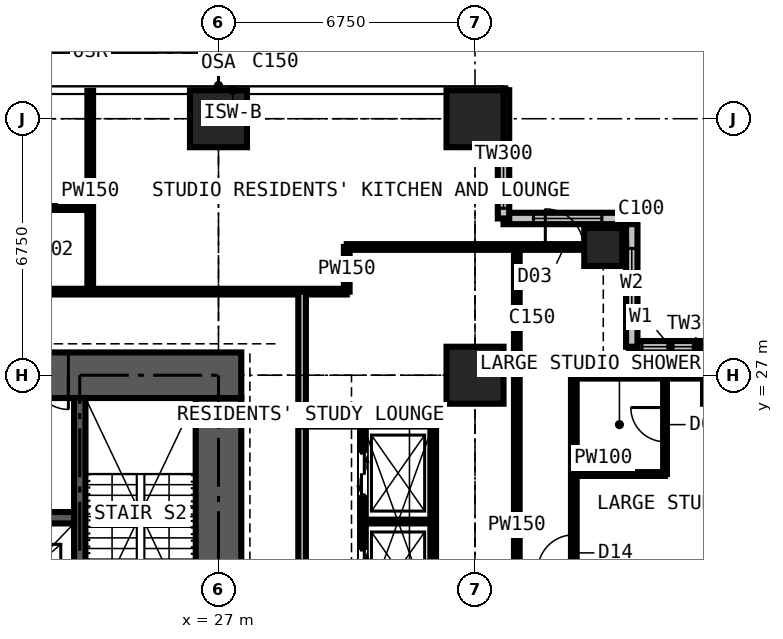
"""IFC4 building model, lengths in metres.
Left out: names, types, materials, properties, quantities, classifications, styles, units other than length and angle.
Written with IfcOpenShell. Run it as: python <this file> out.ifc"""

import sys

from ifc_helpers import new_model, si_unit, direction, frame, frame_2d, origin, origin_2d, place, context, subcontext, project, spatial, rectangle, extrude, element, fill, save


model = new_model("IFC4")
c1 = context("Model", 3, precision=1e-05, world=origin(), true_north=direction((0.0, 1.0)))
c2 = subcontext(c1, "Body", "Model", "MODEL_VIEW")
j1 = project(units=[si_unit("LENGTHUNIT", "METRE"), si_unit("PLANEANGLEUNIT", "RADIAN")], contexts=[c1])
p1 = place(None, origin())
s1 = spatial("IfcSite", under=j1, at=p1, CompositionType="ELEMENT")
p2 = place(p1, origin())
s2 = spatial("IfcBuilding", under=s1, at=p2, CompositionType="ELEMENT")
p3 = place(p2, frame((0.0, 0.0, 116.1)))
s3 = spatial("IfcBuildingStorey", under=s2, at=p3, CompositionType="ELEMENT", Elevation=116.1)
for number, where, z_axis, x_axis in (
    (1, (27.0, 33.75, 0.0), (0.0, 0.0, 1.0), (1.0, 0.0, 0.0)),
    (2, (33.75, 27.0, 0.0), (0.0, 0.0, 1.0), (1.0, 0.0, 0.0)),
    (3, (33.75, 33.75, 0.0), (0.0, 0.0, 1.0), (1.0, 0.0, 0.0)),
):
    element("IfcColumn", number, at=place(p3, frame(where, z_axis=z_axis, x_axis=x_axis)), inside=s3, PredefinedType="COLUMN", context=c2, shape_type="SweptSolid", body=[
        extrude(rectangle(XDim=1.5, YDim=1.5, at=origin_2d()), origin(), (0.0, 0.0, 1.0), 3.6),
    ])
p4 = place(p3, frame((37.125, 30.375, 0.0), z_axis=(0.0, 0.0, 1.0), x_axis=(1.0, 0.0, 0.0)))
e4 = element("IfcColumn", 4, at=p4, inside=s3, PredefinedType="COLUMN", context=c2, shape_type="SweptSolid", body=[
    extrude(rectangle(XDim=1.0, YDim=1.0, at=origin_2d()), origin(), (0.0, 0.0, 1.0), 3.6),
])
p5 = place(p3, frame((27.0, 14.1, 0.0), z_axis=(0.0, 0.0, 1.0), x_axis=(0.0, 1.0, 0.0)))
e5 = element("IfcWall", 5, at=p5, inside=s3, PredefinedType="SHEAR", context=c2, shape_type="SweptSolid", body=[
    extrude(rectangle(XDim=12.3, YDim=1.2, at=frame_2d((6.15, 0.0))), origin(), (0.0, 0.0, 1.0), 3.6),
])
p6 = place(p5, frame((3.65, 0.0, 0.0)))
e6 = element("IfcOpeningElement", 6, at=p6, cuts=e5, PredefinedType="OPENING", context=c2, shape_type="SweptSolid", body=[
    extrude(rectangle(XDim=1.2, YDim=2.2, at=frame_2d((0.6, 1.1))), frame((0.0, 0.61, 0.0), z_axis=(0.0, -1.0, 0.0), x_axis=(1.0, 0.0, 0.0)), (0.0, 0.0, 1.0), 1.22),
])
p7 = place(p3, frame((27.6, 27.0, 0.0), z_axis=(0.0, 0.0, 1.0), x_axis=(-1.0, 0.0, 0.0)))
e7 = element("IfcWall", 7, at=p7, inside=s3, PredefinedType="SHEAR", context=c2, shape_type="SweptSolid", body=[
    extrude(rectangle(XDim=14.7, YDim=1.2, at=frame_2d((7.35, 0.0))), origin(), (0.0, 0.0, 1.0), 3.6),
])
p8 = place(p7, frame((4.55, 0.0, 0.0)))
e8 = element("IfcOpeningElement", 8, at=p8, cuts=e7, PredefinedType="OPENING", context=c2, shape_type="SweptSolid", body=[
    extrude(rectangle(XDim=0.9, YDim=2.2, at=frame_2d((0.45, 1.1))), frame((0.0, 0.61, 0.0), z_axis=(0.0, -1.0, 0.0), x_axis=(1.0, 0.0, 0.0)), (0.0, 0.0, 1.0), 1.22),
])
p9 = place(p7, frame((7.525, 0.0, 0.0)))
e9 = element("IfcOpeningElement", 9, at=p9, cuts=e7, PredefinedType="OPENING", context=c2, shape_type="SweptSolid", body=[
    extrude(rectangle(XDim=1.0, YDim=2.2, at=frame_2d((0.5, 1.1))), frame((0.0, 0.61, 0.0), z_axis=(0.0, -1.0, 0.0), x_axis=(1.0, 0.0, 0.0)), (0.0, 0.0, 1.0), 1.22),
])
p10 = place(p3, frame((41.25, 27.75, 0.0), z_axis=(0.0, 0.0, 1.0), x_axis=(-1.0, 0.0, 0.0)))
e10 = element("IfcWall", 10, at=p10, inside=s3, PredefinedType="SOLIDWALL", context=c2, shape_type="SweptSolid", body=[
    extrude(rectangle(XDim=3.375, YDim=0.3, at=frame_2d((1.688, 0.0))), origin(), (0.0, 0.0, 1.0), 3.375),
])
p11 = place(p10, frame((1.607, 0.0, 0.9)))
e11 = element("IfcOpeningElement", 11, at=p11, cuts=e10, PredefinedType="OPENING", context=c2, shape_type="SweptSolid", body=[
    extrude(rectangle(XDim=1.5, YDim=1.8, at=frame_2d((0.75, 0.9))), frame((0.0, 0.16, 0.0), z_axis=(0.0, -1.0, 0.0), x_axis=(1.0, 0.0, 0.0)), (0.0, 0.0, 1.0), 0.32),
])
p12 = place(p3, frame((37.875, 27.75, 0.0), z_axis=(0.0, 0.0, 1.0), x_axis=(0.0, 1.0, 0.0)))
e12 = element("IfcWall", 12, at=p12, inside=s3, PredefinedType="SOLIDWALL", context=c2, shape_type="SweptSolid", body=[
    extrude(rectangle(XDim=3.375, YDim=0.3, at=frame_2d((1.688, 0.0))), origin(), (0.0, 0.0, 1.0), 3.375),
])
p13 = place(p12, frame((0.788, 0.0, 0.6)))
e13 = element("IfcOpeningElement", 13, at=p13, cuts=e12, PredefinedType="OPENING", context=c2, shape_type="SweptSolid", body=[
    extrude(rectangle(XDim=1.8, YDim=2.1, at=frame_2d((0.9, 1.05))), frame((0.0, 0.16, 0.0), z_axis=(0.0, -1.0, 0.0), x_axis=(1.0, 0.0, 0.0)), (0.0, 0.0, 1.0), 0.32),
])
p14 = place(p3, frame((37.875, 31.125, 0.0), z_axis=(0.0, 0.0, 1.0), x_axis=(-1.0, 0.0, 0.0)))
e14 = element("IfcWall", 14, at=p14, inside=s3, PredefinedType="SOLIDWALL", context=c2, shape_type="SweptSolid", body=[
    extrude(rectangle(XDim=3.375, YDim=0.3, at=frame_2d((1.688, 0.0))), origin(), (0.0, 0.0, 1.0), 3.375),
])
p15 = place(p14, frame((0.788, 0.0, 0.6)))
e15 = element("IfcOpeningElement", 15, at=p15, cuts=e14, PredefinedType="OPENING", context=c2, shape_type="SweptSolid", body=[
    extrude(rectangle(XDim=1.8, YDim=2.1, at=frame_2d((0.9, 1.05))), frame((0.0, 0.16, 0.0), z_axis=(0.0, -1.0, 0.0), x_axis=(1.0, 0.0, 0.0)), (0.0, 0.0, 1.0), 0.32),
])
p16 = place(p3, frame((34.5, 31.125, 0.0), z_axis=(0.0, 0.0, 1.0), x_axis=(0.0, 1.0, 0.0)))
e16 = element("IfcWall", 16, at=p16, inside=s3, PredefinedType="SOLIDWALL", context=c2, shape_type="SweptSolid", body=[
    extrude(rectangle(XDim=3.375, YDim=0.3, at=frame_2d((1.688, 0.0))), origin(), (0.0, 0.0, 1.0), 3.375),
])
p17 = place(p16, frame((0.268, 0.0, 0.9)))
e17 = element("IfcOpeningElement", 17, at=p17, cuts=e16, PredefinedType="OPENING", context=c2, shape_type="SweptSolid", body=[
    extrude(rectangle(XDim=1.5, YDim=1.8, at=frame_2d((0.75, 0.9))), frame((0.0, 0.16, 0.0), z_axis=(0.0, -1.0, 0.0), x_axis=(1.0, 0.0, 0.0)), (0.0, 0.0, 1.0), 0.32),
])
p18 = place(p3, frame((23.35, 20.3, 0.0), z_axis=(0.0, 0.0, 1.0), x_axis=(0.0, 1.0, 0.0)))
e18 = element("IfcWall", 18, at=p18, inside=s3, PredefinedType="SHEAR", context=c2, shape_type="SweptSolid", body=[
    extrude(rectangle(XDim=6.1, YDim=0.3, at=frame_2d((3.05, 0.0))), origin(), (0.0, 0.0, 1.0), 3.6),
])
p19 = place(p3, frame((17.3, 23.25, 0.0), z_axis=(0.0, 0.0, 1.0), x_axis=(1.0, 0.0, 0.0)))
e19 = element("IfcWall", 19, at=p19, inside=s3, PredefinedType="SHEAR", context=c2, shape_type="SweptSolid", body=[
    extrude(rectangle(XDim=5.9, YDim=0.3, at=frame_2d((2.95, 0.0))), origin(), (0.0, 0.0, 1.0), 3.6),
])
p20 = place(p3, frame((11.3, 29.2, 0.0), z_axis=(0.0, 0.0, 1.0), x_axis=(1.0, 0.0, 0.0)))
e20 = element("IfcWall", 20, at=p20, inside=s3, PredefinedType="PARTITIONING", context=c2, shape_type="SweptSolid", body=[
    extrude(rectangle(XDim=19.075, YDim=0.15, at=frame_2d((9.538, 0.0))), origin(), (0.0, 0.0, 1.0), 3.375),
])
p21 = place(p20, frame((5.825, 0.0, 0.0)))
e21 = element("IfcOpeningElement", 21, at=p21, cuts=e20, PredefinedType="OPENING", context=c2, shape_type="SweptSolid", body=[
    extrude(rectangle(XDim=0.95, YDim=2.2, at=frame_2d((0.475, 1.1))), frame((0.0, 0.085, 0.0), z_axis=(0.0, -1.0, 0.0), x_axis=(1.0, 0.0, 0.0)), (0.0, 0.0, 1.0), 0.17),
])
p22 = place(p20, frame((9.2, 0.0, 0.0)))
e22 = element("IfcOpeningElement", 22, at=p22, cuts=e20, PredefinedType="OPENING", context=c2, shape_type="SweptSolid", body=[
    extrude(rectangle(XDim=0.95, YDim=2.2, at=frame_2d((0.475, 1.1))), frame((0.0, 0.085, 0.0), z_axis=(0.0, -1.0, 0.0), x_axis=(1.0, 0.0, 0.0)), (0.0, 0.0, 1.0), 0.17),
])
p23 = place(p20, frame((0.6, 0.0, 0.0)))
e23 = element("IfcOpeningElement", 23, at=p23, cuts=e20, PredefinedType="OPENING", context=c2, shape_type="SweptSolid", body=[
    extrude(rectangle(XDim=1.0, YDim=2.2, at=frame_2d((0.5, 1.1))), frame((0.0, 0.085, 0.0), z_axis=(0.0, -1.0, 0.0), x_axis=(1.0, 0.0, 0.0)), (0.0, 0.0, 1.0), 0.17),
])
p24 = place(p3, frame((21.625, 31.4, 0.0), z_axis=(0.0, 0.0, 1.0), x_axis=(1.0, 0.0, 0.0)))
e24 = element("IfcWall", 24, at=p24, inside=s3, PredefinedType="PARTITIONING", context=c2, shape_type="SweptSolid", body=[
    extrude(rectangle(XDim=2.0, YDim=0.1, at=frame_2d((1.0, 0.0))), origin(), (0.0, 0.0, 1.0), 3.375),
])
p25 = place(p3, frame((23.625, 29.2, 0.0), z_axis=(0.0, 0.0, 1.0), x_axis=(0.0, 1.0, 0.0)))
e25 = element("IfcWall", 25, at=p25, inside=s3, PredefinedType="PARTITIONING", context=c2, shape_type="SweptSolid", body=[
    extrude(rectangle(XDim=5.284, YDim=0.15, at=frame_2d((2.642, 0.0))), origin(), (0.0, 0.0, 1.0), 3.375),
])
p26 = place(p3, frame((29.2, 11.3, 0.0), z_axis=(0.0, 0.0, 1.0), x_axis=(0.0, 1.0, 0.0)))
e26 = element("IfcWall", 26, at=p26, inside=s3, PredefinedType="PARTITIONING", context=c2, shape_type="SweptSolid", body=[
    extrude(rectangle(XDim=17.9, YDim=0.2, at=frame_2d((8.95, 0.0))), origin(), (0.0, 0.0, 1.0), 3.375),
])
p27 = place(p26, frame((8.35, 0.0, 0.0)))
e27 = element("IfcOpeningElement", 27, at=p27, cuts=e26, PredefinedType="OPENING", context=c2, shape_type="SweptSolid", body=[
    extrude(rectangle(XDim=1.2, YDim=2.2, at=frame_2d((0.6, 1.1))), frame((0.0, 0.11, 0.0), z_axis=(0.0, -1.0, 0.0), x_axis=(1.0, 0.0, 0.0)), (0.0, 0.0, 1.0), 0.22),
])
p28 = place(p3, frame((29.2, 25.7, 0.0), z_axis=(0.0, 0.0, 1.0), x_axis=(1.0, 0.0, 0.0)))
e28 = element("IfcWall", 28, at=p28, inside=s3, PredefinedType="SHEAR", context=c2, shape_type="SweptSolid", body=[
    extrude(rectangle(XDim=3.45, YDim=0.1, at=frame_2d((1.725, 0.0))), origin(), (0.0, 0.0, 1.0), 3.375),
])
p29 = place(p3, frame((30.375, 29.2, 0.0), z_axis=(0.0, 0.0, 1.0), x_axis=(0.0, 1.0, 0.0)))
e29 = element("IfcWall", 29, at=p29, inside=s3, PredefinedType="PARTITIONING", context=c2, shape_type="SweptSolid", body=[
    extrude(rectangle(XDim=1.175, YDim=0.15, at=frame_2d((0.587, 0.0))), origin(), (0.0, 0.0, 1.0), 3.375),
])
p30 = place(p3, frame((30.375, 30.375, 0.0), z_axis=(0.0, 0.0, 1.0), x_axis=(1.0, 0.0, 0.0)))
e30 = element("IfcWall", 30, at=p30, inside=s3, PredefinedType="PARTITIONING", context=c2, shape_type="SweptSolid", body=[
    extrude(rectangle(XDim=7.35, YDim=0.15, at=frame_2d((3.675, 0.0))), origin(), (0.0, 0.0, 1.0), 2.877),
])
p31 = place(p30, frame((5.225, 0.0, 0.0)))
e31 = element("IfcOpeningElement", 31, at=p31, cuts=e30, PredefinedType="OPENING", context=c2, shape_type="SweptSolid", body=[
    extrude(rectangle(XDim=1.0, YDim=2.2, at=frame_2d((0.5, 1.1))), frame((0.0, 0.085, 0.0), z_axis=(0.0, -1.0, 0.0), x_axis=(1.0, 0.0, 0.0)), (0.0, 0.0, 1.0), 0.17),
])
p32 = place(p3, frame((30.8, 14.8, 0.0), z_axis=(0.0, 0.0, 1.0), x_axis=(0.0, 1.0, 0.0)))
e32 = element("IfcWall", 32, at=p32, inside=s3, PredefinedType="PARTITIONING", context=c2, shape_type="SweptSolid", body=[
    extrude(rectangle(XDim=10.9, YDim=0.15, at=frame_2d((5.45, 0.0))), origin(), (0.0, 0.0, 1.0), 3.375),
])
p33 = place(p32, frame((0.75, 0.0, 0.0)))
e33 = element("IfcOpeningElement", 33, at=p33, cuts=e32, PredefinedType="OPENING", context=c2, shape_type="SweptSolid", body=[
    extrude(rectangle(XDim=1.1, YDim=2.2, at=frame_2d((0.55, 1.1))), frame((0.0, 0.085, 0.0), z_axis=(0.0, -1.0, 0.0), x_axis=(1.0, 0.0, 0.0)), (0.0, 0.0, 1.0), 0.17),
])
p34 = place(p32, frame((3.25, 0.0, 0.0)))
e34 = element("IfcOpeningElement", 34, at=p34, cuts=e32, PredefinedType="OPENING", context=c2, shape_type="SweptSolid", body=[
    extrude(rectangle(XDim=1.1, YDim=2.2, at=frame_2d((0.55, 1.1))), frame((0.0, 0.085, 0.0), z_axis=(0.0, -1.0, 0.0), x_axis=(1.0, 0.0, 0.0)), (0.0, 0.0, 1.0), 0.17),
])
p35 = place(p32, frame((6.5, 0.0, 0.0)))
e35 = element("IfcOpeningElement", 35, at=p35, cuts=e32, PredefinedType="OPENING", context=c2, shape_type="SweptSolid", body=[
    extrude(rectangle(XDim=1.1, YDim=2.2, at=frame_2d((0.55, 1.1))), frame((0.0, 0.085, 0.0), z_axis=(0.0, -1.0, 0.0), x_axis=(1.0, 0.0, 0.0)), (0.0, 0.0, 1.0), 0.17),
])
p36 = place(p32, frame((9.05, 0.0, 0.0)))
e36 = element("IfcOpeningElement", 36, at=p36, cuts=e32, PredefinedType="OPENING", context=c2, shape_type="SweptSolid", body=[
    extrude(rectangle(XDim=1.1, YDim=2.2, at=frame_2d((0.55, 1.1))), frame((0.0, 0.085, 0.0), z_axis=(0.0, -1.0, 0.0), x_axis=(1.0, 0.0, 0.0)), (0.0, 0.0, 1.0), 0.17),
])
p37 = place(p3, frame((30.8, 23.15, 0.0), z_axis=(0.0, 0.0, 1.0), x_axis=(1.0, 0.0, 0.0)))
e37 = element("IfcWall", 37, at=p37, inside=s3, PredefinedType="SHEAR", context=c2, shape_type="SweptSolid", body=[
    extrude(rectangle(XDim=1.85, YDim=0.1, at=frame_2d((0.925, 0.0))), origin(), (0.0, 0.0, 1.0), 3.375),
])
p38 = place(p3, frame((32.65, 20.6, 0.0), z_axis=(0.0, 0.0, 1.0), x_axis=(0.0, 1.0, 0.0)))
e38 = element("IfcWall", 38, at=p38, inside=s3, PredefinedType="PARTITIONING", context=c2, shape_type="SweptSolid", body=[
    extrude(rectangle(XDim=5.1, YDim=0.15, at=frame_2d((2.55, 0.0))), origin(), (0.0, 0.0, 1.0), 3.375),
])
p39 = place(p3, frame((34.85, 12.55, 0.0), z_axis=(0.0, 0.0, 1.0), x_axis=(0.0, 1.0, 0.0)))
e39 = element("IfcWall", 39, at=p39, inside=s3, PredefinedType="PARTITIONING", context=c2, shape_type="SweptSolid", body=[
    extrude(rectangle(XDim=17.825, YDim=0.15, at=frame_2d((8.913, 0.0))), origin(), (0.0, 0.0, 1.0), 3.375),
])
p40 = place(p39, frame((8.5, 0.0, 0.0)))
e40 = element("IfcOpeningElement", 40, at=p40, cuts=e39, PredefinedType="OPENING", context=c2, shape_type="SweptSolid", body=[
    extrude(rectangle(XDim=0.95, YDim=2.2, at=frame_2d((0.475, 1.1))), frame((0.0, 0.085, 0.0), z_axis=(0.0, -1.0, 0.0), x_axis=(1.0, 0.0, 0.0)), (0.0, 0.0, 1.0), 0.17),
])
p41 = place(p3, frame((36.35, 6.75, 0.0), z_axis=(0.0, 0.0, 1.0), x_axis=(0.0, 1.0, 0.0)))
e41 = element("IfcWall", 41, at=p41, inside=s3, PredefinedType="PARTITIONING", context=c2, shape_type="SweptSolid", body=[
    extrude(rectangle(XDim=20.25, YDim=0.15, at=frame_2d((10.125, 0.0))), origin(), (0.0, 0.0, 1.0), 3.375),
])
p42 = place(p41, frame((15.1, 0.0, 0.0)))
e42 = element("IfcOpeningElement", 42, at=p42, cuts=e41, PredefinedType="OPENING", context=c2, shape_type="SweptSolid", body=[
    extrude(rectangle(XDim=0.95, YDim=2.2, at=frame_2d((0.475, 1.1))), frame((0.0, 0.085, 0.0), z_axis=(0.0, -1.0, 0.0), x_axis=(1.0, 0.0, 0.0)), (0.0, 0.0, 1.0), 0.17),
])
p43 = place(p41, frame((8.35, 0.0, 0.0)))
e43 = element("IfcOpeningElement", 43, at=p43, cuts=e41, PredefinedType="OPENING", context=c2, shape_type="SweptSolid", body=[
    extrude(rectangle(XDim=0.95, YDim=2.2, at=frame_2d((0.475, 1.1))), frame((0.0, 0.085, 0.0), z_axis=(0.0, -1.0, 0.0), x_axis=(1.0, 0.0, 0.0)), (0.0, 0.0, 1.0), 0.17),
])
p44 = place(p41, frame((3.575, 0.0, 0.0)))
e44 = element("IfcOpeningElement", 44, at=p44, cuts=e41, PredefinedType="OPENING", context=c2, shape_type="SweptSolid", body=[
    extrude(rectangle(XDim=0.95, YDim=2.2, at=frame_2d((0.475, 1.1))), frame((0.0, 0.085, 0.0), z_axis=(0.0, -1.0, 0.0), x_axis=(1.0, 0.0, 0.0)), (0.0, 0.0, 1.0), 0.17),
])
p45 = place(p3, frame((36.35, 24.4, 0.0), z_axis=(0.0, 0.0, 1.0), x_axis=(1.0, 0.0, 0.0)))
e45 = element("IfcWall", 45, at=p45, inside=s3, PredefinedType="PARTITIONING", context=c2, shape_type="SweptSolid", body=[
    extrude(rectangle(XDim=2.4, YDim=0.1, at=frame_2d((1.2, 0.0))), origin(), (0.0, 0.0, 1.0), 3.375),
])
p46 = place(p3, frame((36.35, 27.0, 0.0), z_axis=(0.0, 0.0, 1.0), x_axis=(1.0, 0.0, 0.0)))
e46 = element("IfcWall", 46, at=p46, inside=s3, PredefinedType="PARTITIONING", context=c2, shape_type="SweptSolid", body=[
    extrude(rectangle(XDim=4.884, YDim=0.175, at=frame_2d((2.442, 0.0))), origin(), (0.0, 0.0, 1.0), 2.877),
])
p47 = place(p3, frame((37.875, 27.0, 0.0), z_axis=(0.0, 0.0, 1.0), x_axis=(0.0, 1.0, 0.0)))
e47 = element("IfcWall", 47, at=p47, inside=s3, PredefinedType="PARTITIONING", context=c2, shape_type="SweptSolid", body=[
    extrude(rectangle(XDim=0.734, YDim=0.15, at=frame_2d((0.367, 0.0))), origin(), (0.0, 0.0, 1.0), 3.375),
])
p48 = place(p3, frame((38.75, 24.4, 0.0), z_axis=(0.0, 0.0, 1.0), x_axis=(0.0, 1.0, 0.0)))
e48 = element("IfcWall", 48, at=p48, inside=s3, PredefinedType="PARTITIONING", context=c2, shape_type="SweptSolid", body=[
    extrude(rectangle(XDim=2.6, YDim=0.1, at=frame_2d((1.3, 0.0))), origin(), (0.0, 0.0, 1.0), 3.375),
])
p49 = place(p48, frame((0.85, 0.0, 0.0)))
e49 = element("IfcOpeningElement", 49, at=p49, cuts=e48, PredefinedType="OPENING", context=c2, shape_type="SweptSolid", body=[
    extrude(rectangle(XDim=0.9, YDim=2.2, at=frame_2d((0.45, 1.1))), frame((0.0, 0.06, 0.0), z_axis=(0.0, -1.0, 0.0), x_axis=(1.0, 0.0, 0.0)), (0.0, 0.0, 1.0), 0.12),
])
p50 = place(p11, origin())
e50 = element("IfcWindow", 50, at=p50, inside=s3, PartitioningType="SINGLE_PANEL", PredefinedType="WINDOW", context=c2, shape_type="SweptSolid", body=[
    extrude(rectangle(XDim=1.5, YDim=1.8, at=frame_2d((0.75, 0.9))), frame((0.0, 0.03, 0.0), z_axis=(0.0, -1.0, 0.0), x_axis=(1.0, 0.0, 0.0)), (0.0, 0.0, 1.0), 0.06),
])
fill(e11, e50)
p51 = place(p13, origin())
e51 = element("IfcWindow", 51, at=p51, inside=s3, PartitioningType="SINGLE_PANEL", PredefinedType="WINDOW", context=c2, shape_type="SweptSolid", body=[
    extrude(rectangle(XDim=1.8, YDim=2.1, at=frame_2d((0.9, 1.05))), frame((0.0, 0.03, 0.0), z_axis=(0.0, -1.0, 0.0), x_axis=(1.0, 0.0, 0.0)), (0.0, 0.0, 1.0), 0.06),
])
fill(e13, e51)
p52 = place(p15, origin())
e52 = element("IfcWindow", 52, at=p52, inside=s3, PartitioningType="SINGLE_PANEL", PredefinedType="WINDOW", context=c2, shape_type="SweptSolid", body=[
    extrude(rectangle(XDim=1.8, YDim=2.1, at=frame_2d((0.9, 1.05))), frame((0.0, 0.03, 0.0), z_axis=(0.0, -1.0, 0.0), x_axis=(1.0, 0.0, 0.0)), (0.0, 0.0, 1.0), 0.06),
])
fill(e15, e52)
p53 = place(p17, origin())
e53 = element("IfcWindow", 53, at=p53, inside=s3, PartitioningType="SINGLE_PANEL", PredefinedType="WINDOW", context=c2, shape_type="SweptSolid", body=[
    extrude(rectangle(XDim=1.5, YDim=1.8, at=frame_2d((0.75, 0.9))), frame((0.0, 0.03, 0.0), z_axis=(0.0, -1.0, 0.0), x_axis=(1.0, 0.0, 0.0)), (0.0, 0.0, 1.0), 0.06),
])
fill(e17, e53)
p54 = place(p8, origin())
e54 = element("IfcDoor", 54, at=p54, inside=s3, OperationType="SINGLE_SWING_LEFT", PredefinedType="DOOR", context=c2, shape_type="SweptSolid", body=[
    extrude(rectangle(XDim=0.9, YDim=2.2, at=frame_2d((0.45, 1.1))), frame((0.0, 0.4, 0.0), z_axis=(0.0, -1.0, 0.0), x_axis=(1.0, 0.0, 0.0)), (0.0, 0.0, 1.0), 0.8),
])
fill(e8, e54)
p55 = place(p42, origin())
e55 = element("IfcDoor", 55, at=p55, inside=s3, OperationType="SINGLE_SWING_LEFT", PredefinedType="DOOR", context=c2, shape_type="SweptSolid", body=[
    extrude(rectangle(XDim=0.95, YDim=2.2, at=frame_2d((0.475, 1.1))), frame((0.0, 0.025, 0.0), z_axis=(0.0, -1.0, 0.0), x_axis=(1.0, 0.0, 0.0)), (0.0, 0.0, 1.0), 0.05),
])
fill(e42, e55)
p56 = place(p49, origin())
e56 = element("IfcDoor", 56, at=p56, inside=s3, OperationType="SINGLE_SWING_RIGHT", PredefinedType="DOOR", context=c2, shape_type="SweptSolid", body=[
    extrude(rectangle(XDim=0.9, YDim=2.2, at=frame_2d((0.45, 1.1))), frame((0.0, 0.025, 0.0), z_axis=(0.0, -1.0, 0.0), x_axis=(1.0, 0.0, 0.0)), (0.0, 0.0, 1.0), 0.05),
])
fill(e49, e56)
p57 = place(p31, origin())
e57 = element("IfcDoor", 57, at=p57, inside=s3, OperationType="SINGLE_SWING_LEFT", PredefinedType="DOOR", context=c2, shape_type="SweptSolid", body=[
    extrude(rectangle(XDim=1.0, YDim=2.2, at=frame_2d((0.5, 1.1))), frame((0.0, 0.025, 0.0), z_axis=(0.0, -1.0, 0.0), x_axis=(1.0, 0.0, 0.0)), (0.0, 0.0, 1.0), 0.05),
])
fill(e31, e57)
p58 = place(p35, origin())
e58 = element("IfcDoor", 58, at=p58, inside=s3, OperationType="DOUBLE_DOOR_SLIDING", PredefinedType="DOOR", context=c2, shape_type="SweptSolid", body=[
    extrude(rectangle(XDim=1.1, YDim=2.2, at=frame_2d((0.55, 1.1))), frame((0.0, 0.025, 0.0), z_axis=(0.0, -1.0, 0.0), x_axis=(1.0, 0.0, 0.0)), (0.0, 0.0, 1.0), 0.05),
])
fill(e35, e58)
p59 = place(p36, origin())
e59 = element("IfcDoor", 59, at=p59, inside=s3, OperationType="DOUBLE_DOOR_SLIDING", PredefinedType="DOOR", context=c2, shape_type="SweptSolid", body=[
    extrude(rectangle(XDim=1.1, YDim=2.2, at=frame_2d((0.55, 1.1))), frame((0.0, 0.025, 0.0), z_axis=(0.0, -1.0, 0.0), x_axis=(1.0, 0.0, 0.0)), (0.0, 0.0, 1.0), 0.05),
])
fill(e36, e59)
save(model, sys.argv[1])
